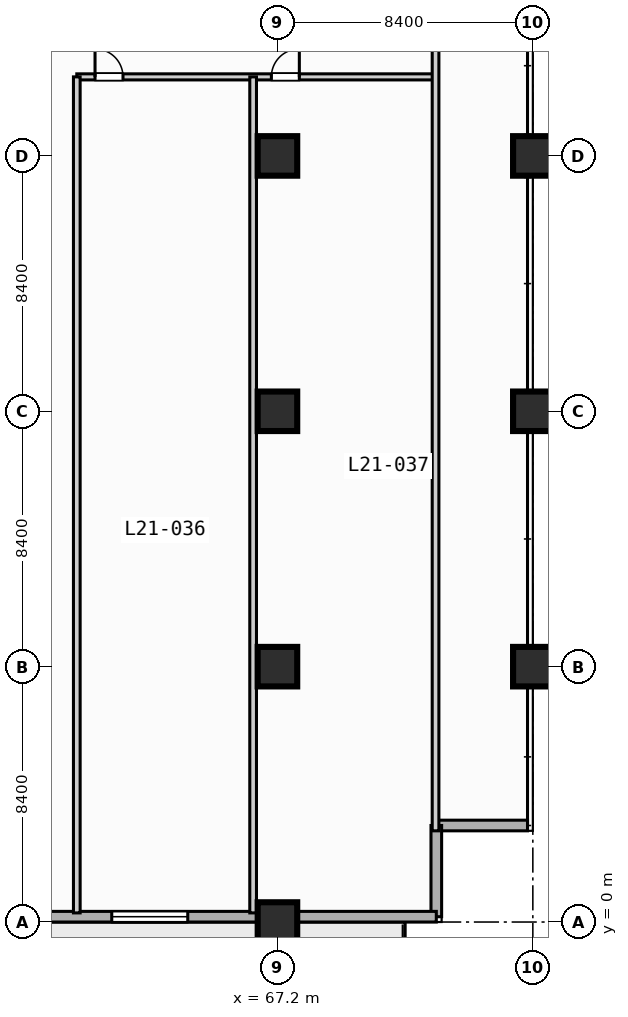
"""IFC4 building model, lengths in metres.
Left out: names, types, materials, properties, quantities, classifications, styles, units other than length and angle.
Written with IfcOpenShell. Run it as: python <this file> out.ifc"""

import sys

from ifc_helpers import new_model, si_unit, direction, frame, frame_2d, origin, origin_2d, place, context, subcontext, project, spatial, rectangle, extrude, element, fill, save


model = new_model("IFC4")
c1 = context("Model", 3, precision=1e-05, world=origin(), true_north=direction((0.0, 1.0)))
c2 = subcontext(c1, "Body", "Model", "MODEL_VIEW")
j1 = project(units=[si_unit("LENGTHUNIT", "METRE"), si_unit("PLANEANGLEUNIT", "RADIAN")], contexts=[c1])
p1 = place(None, origin())
s1 = spatial("IfcSite", under=j1, at=p1, CompositionType="ELEMENT")
p2 = place(p1, origin())
s2 = spatial("IfcBuilding", under=s1, at=p2, CompositionType="ELEMENT")
p3 = place(p2, frame((0.0, 0.0, 89.6)))
s3 = spatial("IfcBuildingStorey", under=s2, at=p3, CompositionType="ELEMENT", Elevation=89.6)
for number, where, z_axis, x_axis in (
    (1, (67.2, 0.0, 0.0), (0.0, 0.0, 1.0), (1.0, 0.0, 0.0)),
    (2, (67.2, 8.4, 0.0), (0.0, 0.0, 1.0), (1.0, 0.0, 0.0)),
    (3, (67.2, 16.8, 0.0), (0.0, 0.0, 1.0), (1.0, 0.0, 0.0)),
    (4, (67.2, 25.2, 0.0), (0.0, 0.0, 1.0), (1.0, 0.0, 0.0)),
    (5, (75.6, 8.4, 0.0), (0.0, 0.0, 1.0), (1.0, 0.0, 0.0)),
    (6, (75.6, 16.8, 0.0), (0.0, 0.0, 1.0), (1.0, 0.0, 0.0)),
    (7, (75.6, 25.2, 0.0), (0.0, 0.0, 1.0), (1.0, 0.0, 0.0)),
):
    element("IfcColumn", number, at=place(p3, frame(where, z_axis=z_axis, x_axis=x_axis)), inside=s3, PredefinedType="COLUMN", context=c2, shape_type="SweptSolid", body=[
        extrude(rectangle(XDim=1.3, YDim=1.3, at=origin_2d()), origin(), (0.0, 0.0, 1.0), 4.4),
    ])
for number, where, z_axis, x_axis in (
    (8, (75.425, 3.175, 0.0), (0.0, 0.0, 1.0), (-1.0, 0.0, 0.0)),
    (9, (72.425, 3.175, 0.0), (0.0, 0.0, 1.0), (0.0, -1.0, 0.0)),
):
    element("IfcWall", number, at=place(p3, frame(where, z_axis=z_axis, x_axis=x_axis)), inside=s3, PredefinedType="STANDARD", context=c2, shape_type="SweptSolid", body=[
        extrude(rectangle(XDim=3.0, YDim=0.35, at=frame_2d((1.5, 0.0))), origin(), (0.0, 0.0, 1.0), 4.05),
    ])
p4 = place(p3, frame((72.425, 0.175, 0.0), z_axis=(0.0, 0.0, 1.0), x_axis=(-1.0, 0.0, 0.0)))
e10 = element("IfcWall", 10, at=p4, inside=s3, PredefinedType="STANDARD", context=c2, shape_type="SweptSolid", body=[
    extrude(rectangle(XDim=69.25, YDim=0.35, at=frame_2d((34.625, 0.0))), origin(), (0.0, 0.0, 1.0), 4.05),
])
p5 = place(p4, frame((50.725, 0.0, 0.0)))
e11 = element("IfcOpeningElement", 11, at=p5, cuts=e10, PredefinedType="OPENING", context=c2, shape_type="SweptSolid", body=[
    extrude(rectangle(XDim=1.4, YDim=2.2, at=frame_2d((0.7, 1.1))), frame((0.0, 0.185, 0.0), z_axis=(0.0, -1.0, 0.0), x_axis=(1.0, 0.0, 0.0)), (0.0, 0.0, 1.0), 0.37),
])
p6 = place(p4, frame((8.175, 0.0, 0.85)))
e12 = element("IfcOpeningElement", 12, at=p6, cuts=e10, PredefinedType="OPENING", context=c2, shape_type="SweptSolid", body=[
    extrude(rectangle(XDim=2.5, YDim=2.2, at=frame_2d((1.25, 1.1))), frame((0.0, 0.185, 0.0), z_axis=(0.0, -1.0, 0.0), x_axis=(1.0, 0.0, 0.0)), (0.0, 0.0, 1.0), 0.37),
])
p7 = place(p3, frame((60.6, 27.8, 0.0), z_axis=(0.0, 0.0, 1.0), x_axis=(1.0, 0.0, 0.0)))
e13 = element("IfcWall", 13, at=p7, inside=s3, PredefinedType="PARTITIONING", context=c2, shape_type="SweptSolid", body=[
    extrude(rectangle(XDim=11.8, YDim=0.2, at=frame_2d((5.9, 0.0))), origin(), (0.0, 0.0, 1.0), 4.05),
])
p8 = place(p7, frame((0.6, 0.0, 0.0)))
e14 = element("IfcOpeningElement", 14, at=p8, cuts=e13, PredefinedType="OPENING", context=c2, shape_type="SweptSolid", body=[
    extrude(rectangle(XDim=0.92, YDim=2.1, at=frame_2d((0.46, 1.05))), frame((0.0, 0.11, 0.0), z_axis=(0.0, -1.0, 0.0), x_axis=(1.0, 0.0, 0.0)), (0.0, 0.0, 1.0), 0.22),
])
p9 = place(p7, frame((6.4, 0.0, 0.0)))
e15 = element("IfcOpeningElement", 15, at=p9, cuts=e13, PredefinedType="OPENING", context=c2, shape_type="SweptSolid", body=[
    extrude(rectangle(XDim=0.92, YDim=2.1, at=frame_2d((0.46, 1.05))), frame((0.0, 0.11, 0.0), z_axis=(0.0, -1.0, 0.0), x_axis=(1.0, 0.0, 0.0)), (0.0, 0.0, 1.0), 0.22),
])
p10 = place(p3, frame((60.6, 0.3, 0.0), z_axis=(0.0, 0.0, 1.0), x_axis=(0.0, 1.0, 0.0)))
e16 = element("IfcWall", 16, at=p10, inside=s3, PredefinedType="PARTITIONING", context=c2, shape_type="SweptSolid", body=[
    extrude(rectangle(XDim=27.5, YDim=0.22, at=frame_2d((13.75, 0.0))), origin(), (0.0, 0.0, 1.0), 4.05),
])
p11 = place(p3, frame((72.4, 3.0, 0.0), z_axis=(0.0, 0.0, 1.0), x_axis=(0.0, 1.0, 0.0)))
e17 = element("IfcWall", 17, at=p11, inside=s3, PredefinedType="PARTITIONING", context=c2, shape_type="SweptSolid", body=[
    extrude(rectangle(XDim=27.4, YDim=0.22, at=frame_2d((13.7, 0.0))), origin(), (0.0, 0.0, 1.0), 4.05),
])
p12 = place(p3, frame((66.4, 0.3, 0.0), z_axis=(0.0, 0.0, 1.0), x_axis=(0.0, 1.0, 0.0)))
e18 = element("IfcWall", 18, at=p12, inside=s3, PredefinedType="PARTITIONING", context=c2, shape_type="SweptSolid", body=[
    extrude(rectangle(XDim=27.5, YDim=0.22, at=frame_2d((13.75, 0.0))), origin(), (0.0, 0.0, 1.0), 4.05),
])
p13 = place(p6, origin())
e19 = element("IfcWindow", 19, at=p13, inside=s3, PartitioningType="SINGLE_PANEL", PredefinedType="WINDOW", context=c2, shape_type="SweptSolid", body=[
    extrude(rectangle(XDim=2.5, YDim=2.2, at=frame_2d((1.25, 1.1))), frame((0.0, 0.03, 0.0), z_axis=(0.0, -1.0, 0.0), x_axis=(1.0, 0.0, 0.0)), (0.0, 0.0, 1.0), 0.06),
])
fill(e12, e19)
p14 = place(p8, origin())
e20 = element("IfcDoor", 20, at=p14, inside=s3, OperationType="SINGLE_SWING_LEFT", PredefinedType="DOOR", context=c2, shape_type="SweptSolid", body=[
    extrude(rectangle(XDim=0.92, YDim=2.1, at=frame_2d((0.46, 1.05))), frame((0.0, 0.025, 0.0), z_axis=(0.0, -1.0, 0.0), x_axis=(1.0, 0.0, 0.0)), (0.0, 0.0, 1.0), 0.05),
])
fill(e14, e20)
p15 = place(p9, origin())
e21 = element("IfcDoor", 21, at=p15, inside=s3, OperationType="SINGLE_SWING_RIGHT", PredefinedType="DOOR", context=c2, shape_type="SweptSolid", body=[
    extrude(rectangle(XDim=0.92, YDim=2.1, at=frame_2d((0.46, 1.05))), frame((0.0, 0.025, 0.0), z_axis=(0.0, -1.0, 0.0), x_axis=(1.0, 0.0, 0.0)), (0.0, 0.0, 1.0), 0.05),
])
fill(e15, e21)
save(model, sys.argv[1])
